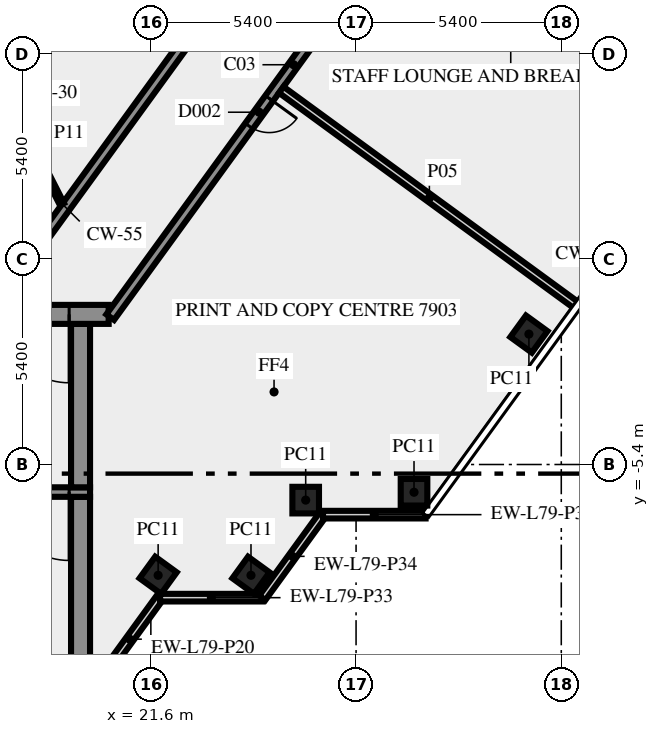
"""IFC4 building model, lengths in metres.
Left out: names, types, materials, properties, quantities, classifications, styles, units other than length and angle.
Written with IfcOpenShell. Run it as: python <this file> out.ifc"""

import sys

from ifc_helpers import new_model, si_unit, direction, frame, frame_2d, origin, origin_2d, place, context, subcontext, project, spatial, rectangle, extrude, element, fill, save


model = new_model("IFC4")
c1 = context("Model", 3, precision=1e-05, world=origin(), true_north=direction((0.0, 1.0)))
c2 = subcontext(c1, "Body", "Model", "MODEL_VIEW")
j1 = project(units=[si_unit("LENGTHUNIT", "METRE"), si_unit("PLANEANGLEUNIT", "RADIAN")], contexts=[c1])
p1 = place(None, origin())
s1 = spatial("IfcSite", under=j1, at=p1, CompositionType="ELEMENT")
p2 = place(p1, origin())
s2 = spatial("IfcBuilding", under=s1, at=p2, CompositionType="ELEMENT")
p3 = place(p2, frame((0.0, 0.0, 339.0)))
s3 = spatial("IfcBuildingStorey", under=s2, at=p3, CompositionType="ELEMENT", Elevation=339.0)
for number, where, z_axis, x_axis in (
    (1, (21.792, -8.315, 0.0), (0.0, 0.0, 1.0), (0.588, 0.809, 0.0)),
    (2, (24.235, -8.315, 0.0), (0.0, 0.0, 1.0), (0.588, 0.809, 0.0)),
    (3, (25.674, -6.337, 0.0), (0.0, 0.0, 1.0), (1.0, 0.0, 0.0)),
    (4, (28.525, -6.13, 0.0), (0.0, 0.0, 1.0), (1.0, 0.0, 0.0)),
    (5, (31.548, -1.969, 0.0), (0.0, 0.0, 1.0), (0.588, 0.809, 0.0)),
):
    element("IfcColumn", number, at=place(p3, frame(where, z_axis=z_axis, x_axis=x_axis)), inside=s3, PredefinedType="COLUMN", context=c2, shape_type="SweptSolid", body=[
        extrude(rectangle(XDim=0.7, YDim=0.7, at=origin_2d()), origin(), (0.0, 0.0, 1.0), 3.65),
    ])
p4 = place(p3, frame((20.253, -11.083, 0.0), z_axis=(0.0, 0.0, 1.0), x_axis=(0.587766567315, 0.809030569476, 0.0)))
e6 = element("IfcWall", 6, at=p4, inside=s3, PredefinedType="SOLIDWALL", context=c2, shape_type="SweptSolid", body=[
    extrude(rectangle(XDim=2.688, YDim=0.2, at=frame_2d((1.344, 0.0))), origin(), (0.0, 0.0, 1.0), 3.65),
])
p5 = place(p3, frame((21.843, -8.904, 0.0), z_axis=(0.0, 0.0, 1.0), x_axis=(1.0, 0.0, 0.0)))
e7 = element("IfcWall", 7, at=p5, inside=s3, PredefinedType="SOLIDWALL", context=c2, shape_type="SweptSolid", body=[
    extrude(rectangle(XDim=2.7, YDim=0.2, at=frame_2d((1.35, 0.0))), origin(), (0.0, 0.0, 1.0), 3.65),
])
p6 = place(p3, frame((24.533, -8.909, 0.0), z_axis=(0.0, 0.0, 1.0), x_axis=(0.587720002413, 0.809064397168, 0.0)))
e8 = element("IfcWall", 8, at=p6, inside=s3, PredefinedType="SOLIDWALL", context=c2, shape_type="SweptSolid", body=[
    extrude(rectangle(XDim=2.7, YDim=0.2, at=frame_2d((1.35, 0.0))), origin(), (0.0, 0.0, 1.0), 3.65),
])
p7 = place(p3, frame((26.13, -6.719, 0.0), z_axis=(0.0, 0.0, 1.0), x_axis=(1.0, 0.0, 0.0)))
e9 = element("IfcWall", 9, at=p7, inside=s3, PredefinedType="SOLIDWALL", context=c2, shape_type="SweptSolid", body=[
    extrude(rectangle(XDim=2.7, YDim=0.2, at=frame_2d((1.35, 0.0))), origin(), (0.0, 0.0, 1.0), 3.65),
])
p8 = place(p3, frame((19.75, -10.5, 0.0), z_axis=(0.0, 0.0, 1.0), x_axis=(0.0, 1.0, 0.0)))
e10 = element("IfcWall", 10, at=p8, inside=s3, PredefinedType="SHEAR", context=c2, shape_type="SweptSolid", body=[
    extrude(rectangle(XDim=4.25, YDim=0.5, at=frame_2d((2.125, 0.0))), origin(), (0.0, 0.0, 1.0), 3.65),
])
p9 = place(p3, frame((20.0, -6.125, 0.0), z_axis=(0.0, 0.0, 1.0), x_axis=(-1.0, 0.0, 0.0)))
e11 = element("IfcWall", 11, at=p9, inside=s3, PredefinedType="SHEAR", context=c2, shape_type="SweptSolid", body=[
    extrude(rectangle(XDim=10.8, YDim=0.25, at=frame_2d((5.4, 0.0))), origin(), (0.0, 0.0, 1.0), 3.65),
])
p10 = place(p9, frame((0.55, 0.0, 0.0)))
e12 = element("IfcOpeningElement", 12, at=p10, cuts=e11, PredefinedType="OPENING", context=c2, shape_type="SweptSolid", body=[
    extrude(rectangle(XDim=1.8, YDim=2.1, at=frame_2d((0.9, 1.05))), frame((0.0, 0.135, 0.0), z_axis=(0.0, -1.0, 0.0), x_axis=(1.0, 0.0, 0.0)), (0.0, 0.0, 1.0), 0.27),
])
p11 = place(p3, frame((19.75, -6.0, 0.0), z_axis=(0.0, 0.0, 1.0), x_axis=(0.0, 1.0, 0.0)))
e13 = element("IfcWall", 13, at=p11, inside=s3, PredefinedType="SHEAR", context=c2, shape_type="SweptSolid", body=[
    extrude(rectangle(XDim=4.3, YDim=0.5, at=frame_2d((2.15, 0.0))), origin(), (0.0, 0.0, 1.0), 3.65),
])
p12 = place(p3, frame((20.49, -1.45, 0.0), z_axis=(0.0, 0.0, 1.0), x_axis=(-1.0, 0.0, 0.0)))
e14 = element("IfcWall", 14, at=p12, inside=s3, PredefinedType="SHEAR", context=c2, shape_type="SweptSolid", body=[
    extrude(rectangle(XDim=40.98, YDim=0.5, at=frame_2d((20.49, 0.0))), origin(), (0.0, 0.0, 1.0), 3.65),
])
p13 = place(p12, frame((38.14, 0.0, 0.0)))
e15 = element("IfcOpeningElement", 15, at=p13, cuts=e14, PredefinedType="OPENING", context=c2, shape_type="SweptSolid", body=[
    extrude(rectangle(XDim=1.8, YDim=2.1, at=frame_2d((0.9, 1.05))), frame((0.0, 0.26, 0.0), z_axis=(0.0, -1.0, 0.0), x_axis=(1.0, 0.0, 0.0)), (0.0, 0.0, 1.0), 0.52),
])
p14 = place(p12, frame((36.728, 0.0, 0.0)))
e16 = element("IfcOpeningElement", 16, at=p14, cuts=e14, PredefinedType="OPENING", context=c2, shape_type="SweptSolid", body=[
    extrude(rectangle(XDim=0.8, YDim=2.1, at=frame_2d((0.4, 1.05))), frame((0.0, 0.26, 0.0), z_axis=(0.0, -1.0, 0.0), x_axis=(1.0, 0.0, 0.0)), (0.0, 0.0, 1.0), 0.52),
])
p15 = place(p12, frame((35.153, 0.0, 0.0)))
e17 = element("IfcOpeningElement", 17, at=p15, cuts=e14, PredefinedType="OPENING", context=c2, shape_type="SweptSolid", body=[
    extrude(rectangle(XDim=0.8, YDim=2.1, at=frame_2d((0.4, 1.05))), frame((0.0, 0.26, 0.0), z_axis=(0.0, -1.0, 0.0), x_axis=(1.0, 0.0, 0.0)), (0.0, 0.0, 1.0), 0.52),
])
p16 = place(p12, frame((32.94, 0.0, 0.0)))
e18 = element("IfcOpeningElement", 18, at=p16, cuts=e14, PredefinedType="OPENING", context=c2, shape_type="SweptSolid", body=[
    extrude(rectangle(XDim=0.9, YDim=2.1, at=frame_2d((0.45, 1.05))), frame((0.0, 0.26, 0.0), z_axis=(0.0, -1.0, 0.0), x_axis=(1.0, 0.0, 0.0)), (0.0, 0.0, 1.0), 0.52),
])
p17 = place(p12, frame((31.015, 0.0, 0.0)))
e19 = element("IfcOpeningElement", 19, at=p17, cuts=e14, PredefinedType="OPENING", context=c2, shape_type="SweptSolid", body=[
    extrude(rectangle(XDim=0.8, YDim=2.1, at=frame_2d((0.4, 1.05))), frame((0.0, 0.26, 0.0), z_axis=(0.0, -1.0, 0.0), x_axis=(1.0, 0.0, 0.0)), (0.0, 0.0, 1.0), 0.52),
])
p18 = place(p12, frame((24.765, 0.0, 0.0)))
e20 = element("IfcOpeningElement", 20, at=p18, cuts=e14, PredefinedType="OPENING", context=c2, shape_type="SweptSolid", body=[
    extrude(rectangle(XDim=0.8, YDim=2.1, at=frame_2d((0.4, 1.05))), frame((0.0, 0.26, 0.0), z_axis=(0.0, -1.0, 0.0), x_axis=(1.0, 0.0, 0.0)), (0.0, 0.0, 1.0), 0.52),
])
p19 = place(p12, frame((19.59, 0.0, 0.0)))
e21 = element("IfcOpeningElement", 21, at=p19, cuts=e14, PredefinedType="OPENING", context=c2, shape_type="SweptSolid", body=[
    extrude(rectangle(XDim=2.0, YDim=2.1, at=frame_2d((1.0, 1.05))), frame((0.0, 0.26, 0.0), z_axis=(0.0, -1.0, 0.0), x_axis=(1.0, 0.0, 0.0)), (0.0, 0.0, 1.0), 0.52),
])
p20 = place(p12, frame((15.103, 0.0, 0.0)))
e22 = element("IfcOpeningElement", 22, at=p20, cuts=e14, PredefinedType="OPENING", context=c2, shape_type="SweptSolid", body=[
    extrude(rectangle(XDim=0.9, YDim=2.1, at=frame_2d((0.45, 1.05))), frame((0.0, 0.26, 0.0), z_axis=(0.0, -1.0, 0.0), x_axis=(1.0, 0.0, 0.0)), (0.0, 0.0, 1.0), 0.52),
])
p21 = place(p12, frame((13.04, 0.0, 0.0)))
e23 = element("IfcOpeningElement", 23, at=p21, cuts=e14, PredefinedType="OPENING", context=c2, shape_type="SweptSolid", body=[
    extrude(rectangle(XDim=0.9, YDim=2.1, at=frame_2d((0.45, 1.05))), frame((0.0, 0.26, 0.0), z_axis=(0.0, -1.0, 0.0), x_axis=(1.0, 0.0, 0.0)), (0.0, 0.0, 1.0), 0.52),
])
p22 = place(p12, frame((10.177, 0.0, 0.0)))
e24 = element("IfcOpeningElement", 24, at=p22, cuts=e14, PredefinedType="OPENING", context=c2, shape_type="SweptSolid", body=[
    extrude(rectangle(XDim=0.9, YDim=2.1, at=frame_2d((0.45, 1.05))), frame((0.0, 0.26, 0.0), z_axis=(0.0, -1.0, 0.0), x_axis=(1.0, 0.0, 0.0)), (0.0, 0.0, 1.0), 0.52),
])
p23 = place(p12, frame((7.14, 0.0, 0.0)))
e25 = element("IfcOpeningElement", 25, at=p23, cuts=e14, PredefinedType="OPENING", context=c2, shape_type="SweptSolid", body=[
    extrude(rectangle(XDim=0.9, YDim=2.1, at=frame_2d((0.45, 1.05))), frame((0.0, 0.26, 0.0), z_axis=(0.0, -1.0, 0.0), x_axis=(1.0, 0.0, 0.0)), (0.0, 0.0, 1.0), 0.52),
])
p24 = place(p12, frame((4.19, 0.0, 0.0)))
e26 = element("IfcOpeningElement", 26, at=p24, cuts=e14, PredefinedType="OPENING", context=c2, shape_type="SweptSolid", body=[
    extrude(rectangle(XDim=0.9, YDim=2.1, at=frame_2d((0.45, 1.05))), frame((0.0, 0.26, 0.0), z_axis=(0.0, -1.0, 0.0), x_axis=(1.0, 0.0, 0.0)), (0.0, 0.0, 1.0), 0.52),
])
p25 = place(p12, frame((1.04, 0.0, 0.0)))
e27 = element("IfcOpeningElement", 27, at=p25, cuts=e14, PredefinedType="OPENING", context=c2, shape_type="SweptSolid", body=[
    extrude(rectangle(XDim=1.8, YDim=2.1, at=frame_2d((0.9, 1.05))), frame((0.0, 0.26, 0.0), z_axis=(0.0, -1.0, 0.0), x_axis=(1.0, 0.0, 0.0)), (0.0, 0.0, 1.0), 0.52),
])
p26 = place(p3, frame((17.545, -1.125, 0.0), z_axis=(0.0, 0.0, 1.0), x_axis=(0.58779555165, 0.809009511354, 0.0)))
e28 = element("IfcWall", 28, at=p26, inside=s3, PredefinedType="SOLIDWALL", context=c2, shape_type="SweptSolid", body=[
    extrude(rectangle(XDim=18.103, YDim=0.25, at=frame_2d((9.052, 0.0))), origin(), (0.0, 0.0, 1.0), 3.65),
])
p27 = place(p26, frame((16.728, 0.0, 0.0)))
e29 = element("IfcOpeningElement", 29, at=p27, cuts=e28, PredefinedType="OPENING", context=c2, shape_type="SweptSolid", body=[
    extrude(rectangle(XDim=0.9, YDim=2.1, at=frame_2d((0.45, 1.05))), frame((0.0, 0.135, 0.0), z_axis=(0.0, -1.0, 0.0), x_axis=(1.0, 0.0, 0.0)), (0.0, 0.0, 1.0), 0.27),
])
p28 = place(p3, frame((30.183, 11.761, 0.0), z_axis=(0.0, 0.0, 1.0), x_axis=(-0.587781762867, -0.80901952958, 0.0)))
e30 = element("IfcWall", 30, at=p28, inside=s3, PredefinedType="SOLIDWALL", context=c2, shape_type="SweptSolid", body=[
    extrude(rectangle(XDim=16.42, YDim=0.25, at=frame_2d((8.21, 0.0))), origin(), (0.0, 0.0, 1.0), 3.65),
])
p29 = place(p28, frame((0.225, 0.0, 0.0)))
e31 = element("IfcOpeningElement", 31, at=p29, cuts=e30, PredefinedType="OPENING", context=c2, shape_type="SweptSolid", body=[
    extrude(rectangle(XDim=0.9, YDim=2.1, at=frame_2d((0.45, 1.05))), frame((0.0, 0.135, 0.0), z_axis=(0.0, -1.0, 0.0), x_axis=(1.0, 0.0, 0.0)), (0.0, 0.0, 1.0), 0.27),
])
p30 = place(p28, frame((9.304, 0.0, 0.0)))
e32 = element("IfcOpeningElement", 32, at=p30, cuts=e30, PredefinedType="OPENING", context=c2, shape_type="SweptSolid", body=[
    extrude(rectangle(XDim=0.9, YDim=2.1, at=frame_2d((0.45, 1.05))), frame((0.0, 0.135, 0.0), z_axis=(0.0, -1.0, 0.0), x_axis=(1.0, 0.0, 0.0)), (0.0, 0.0, 1.0), 0.27),
])
p31 = place(p3, frame((25.032, 4.459, 0.0), z_axis=(0.0, 0.0, 1.0), x_axis=(0.807602415854, -0.589727342004, 0.0)))
e33 = element("IfcWall", 33, at=p31, inside=s3, PredefinedType="SOLIDWALL", context=c2, shape_type="SweptSolid", body=[
    extrude(rectangle(XDim=9.651, YDim=0.2, at=frame_2d((4.826, 0.0))), origin(), (0.0, 0.0, 1.0), 2.95),
])
p32 = place(p3, frame((18.0, 3.925, 0.0), z_axis=(0.0, 0.0, 1.0), x_axis=(0.453950796792, -0.891026752736, 0.0)))
e34 = element("IfcWall", 34, at=p32, inside=s3, PredefinedType="PARTITIONING", context=c2, shape_type="SweptSolid", body=[
    extrude(rectangle(XDim=2.778, YDim=0.12, at=frame_2d((1.389, 0.0))), origin(), (0.0, 0.0, 1.0), 3.65),
])
p33 = place(p10, origin())
e35 = element("IfcDoor", 35, at=p33, inside=s3, OperationType="DOUBLE_DOOR_SINGLE_SWING", PredefinedType="DOOR", context=c2, shape_type="SweptSolid", body=[
    extrude(rectangle(XDim=1.8, YDim=2.1, at=frame_2d((0.9, 1.05))), frame((0.0, 0.025, 0.0), z_axis=(0.0, -1.0, 0.0), x_axis=(1.0, 0.0, 0.0)), (0.0, 0.0, 1.0), 0.05),
])
fill(e12, e35)
p34 = place(p25, origin())
e36 = element("IfcDoor", 36, at=p34, inside=s3, OperationType="DOUBLE_DOOR_SINGLE_SWING", PredefinedType="DOOR", context=c2, shape_type="SweptSolid", body=[
    extrude(rectangle(XDim=1.8, YDim=2.1, at=frame_2d((0.9, 1.05))), frame((0.0, 0.025, 0.0), z_axis=(0.0, -1.0, 0.0), x_axis=(1.0, 0.0, 0.0)), (0.0, 0.0, 1.0), 0.05),
])
fill(e27, e36)
p35 = place(p30, origin())
e37 = element("IfcDoor", 37, at=p35, inside=s3, OperationType="SINGLE_SWING_LEFT", PredefinedType="DOOR", context=c2, shape_type="SweptSolid", body=[
    extrude(rectangle(XDim=0.9, YDim=2.1, at=frame_2d((0.45, 1.05))), frame((0.0, 0.025, 0.0), z_axis=(0.0, -1.0, 0.0), x_axis=(1.0, 0.0, 0.0)), (0.0, 0.0, 1.0), 0.05),
])
fill(e32, e37)
save(model, sys.argv[1])
